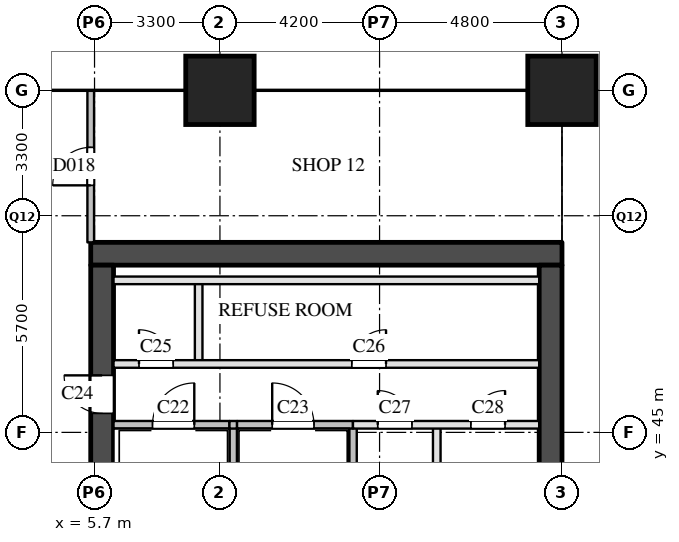
"""IFC4 building model, lengths in metres.
Left out: names, types, materials, properties, quantities, classifications, styles, units other than length and angle.
Written with IfcOpenShell. Run it as: python <this file> out.ifc"""

import sys

from ifc_helpers import new_model, si_unit, direction, frame, frame_2d, origin, origin_2d, place, context, subcontext, project, spatial, rectangle, extrude, element, fill, save


model = new_model("IFC4")
c1 = context("Model", 3, precision=1e-05, world=origin(), true_north=direction((0.0, 1.0)))
c2 = subcontext(c1, "Body", "Model", "MODEL_VIEW")
j1 = project(units=[si_unit("LENGTHUNIT", "METRE"), si_unit("PLANEANGLEUNIT", "RADIAN")], contexts=[c1])
p1 = place(None, origin())
s1 = spatial("IfcSite", under=j1, at=p1, CompositionType="ELEMENT")
p2 = place(p1, origin())
s2 = spatial("IfcBuilding", under=s1, at=p2, CompositionType="ELEMENT")
p3 = place(p2, frame((0.0, 0.0, 14.0)))
s3 = spatial("IfcBuildingStorey", under=s2, at=p3, CompositionType="ELEMENT", Elevation=14.0)
for number, where, z_axis, x_axis in (
    (1, (9.0, 54.0, 0.0), (0.0, 0.0, 1.0), (1.0, 0.0, 0.0)),
    (2, (18.0, 54.0, 0.0), (0.0, 0.0, 1.0), (1.0, 0.0, 0.0)),
):
    element("IfcColumn", number, at=place(p3, frame(where, z_axis=z_axis, x_axis=x_axis)), inside=s3, PredefinedType="COLUMN", context=c2, shape_type="SweptSolid", body=[
        extrude(rectangle(XDim=1.8, YDim=1.8, at=origin_2d()), origin(), (0.0, 0.0, 1.0), 7.0),
    ])
p4 = place(p3, frame((5.6, 49.7, 0.0), z_axis=(0.0, 0.0, 1.0), x_axis=(1.0, 0.0, 0.0)))
e3 = element("IfcWall", 3, at=p4, inside=s3, PredefinedType="SHEAR", context=c2, shape_type="SweptSolid", body=[
    extrude(rectangle(XDim=12.4, YDim=0.6, at=frame_2d((6.2, 0.0))), origin(), (0.0, 0.0, 1.0), 6.59),
])
p5 = place(p3, frame((5.9, 29.1, 0.0), z_axis=(0.0, 0.0, 1.0), x_axis=(0.0, 1.0, 0.0)))
e4 = element("IfcWall", 4, at=p5, inside=s3, PredefinedType="SHEAR", context=c2, shape_type="SweptSolid", body=[
    extrude(rectangle(XDim=20.3, YDim=0.6, at=frame_2d((10.15, 0.0))), origin(), (0.0, 0.0, 1.0), 6.59),
])
p6 = place(p5, frame((3.6, 0.0, 0.0)))
e5 = element("IfcOpeningElement", 5, at=p6, cuts=e4, PredefinedType="OPENING", context=c2, shape_type="SweptSolid", body=[
    extrude(rectangle(XDim=1.8, YDim=2.1, at=frame_2d((0.9, 1.05))), frame((0.0, 0.31, 0.0), z_axis=(0.0, -1.0, 0.0), x_axis=(1.0, 0.0, 0.0)), (0.0, 0.0, 1.0), 0.62),
])
p7 = place(p5, frame((16.4, 0.0, 0.0)))
e6 = element("IfcOpeningElement", 6, at=p7, cuts=e4, PredefinedType="OPENING", context=c2, shape_type="SweptSolid", body=[
    extrude(rectangle(XDim=1.0, YDim=2.1, at=frame_2d((0.5, 1.05))), frame((0.0, 0.31, 0.0), z_axis=(0.0, -1.0, 0.0), x_axis=(1.0, 0.0, 0.0)), (0.0, 0.0, 1.0), 0.62),
])
p8 = place(p3, frame((17.7, 29.1, 0.0), z_axis=(0.0, 0.0, 1.0), x_axis=(0.0, 1.0, 0.0)))
e7 = element("IfcWall", 7, at=p8, inside=s3, PredefinedType="SHEAR", context=c2, shape_type="SweptSolid", body=[
    extrude(rectangle(XDim=20.3, YDim=0.6, at=frame_2d((10.15, 0.0))), origin(), (0.0, 0.0, 1.0), 6.59),
])
p9 = place(p3, frame((8.44, 46.8, 0.0), z_axis=(0.0, 0.0, 1.0), x_axis=(0.0, 1.0, 0.0)))
e8 = element("IfcWall", 8, at=p9, inside=s3, PredefinedType="PARTITIONING", context=c2, shape_type="SweptSolid", body=[
    extrude(rectangle(XDim=2.2, YDim=0.2, at=frame_2d((1.1, 0.0))), origin(), (0.0, 0.0, 1.0), 6.59),
])
for number, where, z_axis, x_axis in (
    (9, (9.35, 43.7, 0.0), (0.0, 0.0, 1.0), (0.0, 1.0, 0.0)),
    (10, (12.5, 43.7, 0.0), (0.0, 0.0, 1.0), (0.0, 1.0, 0.0)),
):
    element("IfcWall", number, at=place(p3, frame(where, z_axis=z_axis, x_axis=x_axis)), inside=s3, PredefinedType="SOLIDWALL", context=c2, shape_type="SweptSolid", body=[
        extrude(rectangle(XDim=1.5, YDim=0.2, at=frame_2d((0.75, 0.0))), origin(), (0.0, 0.0, 1.0), 6.59),
    ])
p10 = place(p3, frame((14.705, 39.0, 0.0), z_axis=(0.0, 0.0, 1.0), x_axis=(0.0, 1.0, 0.0)))
e11 = element("IfcWall", 11, at=p10, inside=s3, PredefinedType="PARTITIONING", context=c2, shape_type="SweptSolid", body=[
    extrude(rectangle(XDim=6.2, YDim=0.2, at=frame_2d((3.1, 0.0))), origin(), (0.0, 0.0, 1.0), 6.59),
])
p11 = place(p3, frame((12.5, 45.2, 0.0), z_axis=(0.0, 0.0, 1.0), x_axis=(1.0, 0.0, 0.0)))
e12 = element("IfcWall", 12, at=p11, inside=s3, PredefinedType="PARTITIONING", context=c2, shape_type="SweptSolid", body=[
    extrude(rectangle(XDim=4.9, YDim=0.2, at=frame_2d((2.45, 0.0))), origin(), (0.0, 0.0, 1.0), 6.59),
])
p12 = place(p11, frame((0.653, 0.0, 0.0)))
e13 = element("IfcOpeningElement", 13, at=p12, cuts=e12, PredefinedType="OPENING", context=c2, shape_type="SweptSolid", body=[
    extrude(rectangle(XDim=0.9, YDim=2.1, at=frame_2d((0.45, 1.05))), frame((0.0, 0.11, 0.0), z_axis=(0.0, -1.0, 0.0), x_axis=(1.0, 0.0, 0.0)), (0.0, 0.0, 1.0), 0.22),
])
p13 = place(p11, frame((3.103, 0.0, 0.0)))
e14 = element("IfcOpeningElement", 14, at=p13, cuts=e12, PredefinedType="OPENING", context=c2, shape_type="SweptSolid", body=[
    extrude(rectangle(XDim=0.9, YDim=2.1, at=frame_2d((0.45, 1.05))), frame((0.0, 0.11, 0.0), z_axis=(0.0, -1.0, 0.0), x_axis=(1.0, 0.0, 0.0)), (0.0, 0.0, 1.0), 0.22),
])
p14 = place(p3, frame((6.2, 45.2, 0.0), z_axis=(0.0, 0.0, 1.0), x_axis=(1.0, 0.0, 0.0)))
e15 = element("IfcWall", 15, at=p14, inside=s3, PredefinedType="SOLIDWALL", context=c2, shape_type="SweptSolid", body=[
    extrude(rectangle(XDim=3.05, YDim=0.2, at=frame_2d((1.525, 0.0))), origin(), (0.0, 0.0, 1.0), 6.59),
])
p15 = place(p14, frame((1.025, 0.0, 0.0)))
e16 = element("IfcOpeningElement", 16, at=p15, cuts=e15, PredefinedType="OPENING", context=c2, shape_type="SweptSolid", body=[
    extrude(rectangle(XDim=1.1, YDim=2.1, at=frame_2d((0.55, 1.05))), frame((0.0, 0.11, 0.0), z_axis=(0.0, -1.0, 0.0), x_axis=(1.0, 0.0, 0.0)), (0.0, 0.0, 1.0), 0.22),
])
p16 = place(p3, frame((9.25, 45.2, 0.0), z_axis=(0.0, 0.0, 1.0), x_axis=(1.0, 0.0, 0.0)))
e17 = element("IfcWall", 17, at=p16, inside=s3, PredefinedType="SOLIDWALL", context=c2, shape_type="SweptSolid", body=[
    extrude(rectangle(XDim=0.2, YDim=0.2, at=frame_2d((0.1, 0.0))), origin(), (0.0, 0.0, 1.0), 6.59),
])
p17 = place(p3, frame((9.45, 45.2, 0.0), z_axis=(0.0, 0.0, 1.0), x_axis=(1.0, 0.0, 0.0)))
e18 = element("IfcWall", 18, at=p17, inside=s3, PredefinedType="SOLIDWALL", context=c2, shape_type="SweptSolid", body=[
    extrude(rectangle(XDim=3.05, YDim=0.2, at=frame_2d((1.525, 0.0))), origin(), (0.0, 0.0, 1.0), 6.59),
])
p18 = place(p17, frame((0.925, 0.0, 0.0)))
e19 = element("IfcOpeningElement", 19, at=p18, cuts=e18, PredefinedType="OPENING", context=c2, shape_type="SweptSolid", body=[
    extrude(rectangle(XDim=1.1, YDim=2.1, at=frame_2d((0.55, 1.05))), frame((0.0, 0.11, 0.0), z_axis=(0.0, -1.0, 0.0), x_axis=(1.0, 0.0, 0.0)), (0.0, 0.0, 1.0), 0.22),
])
p19 = place(p3, frame((6.2, 46.8, 0.0), z_axis=(0.0, 0.0, 1.0), x_axis=(1.0, 0.0, 0.0)))
e20 = element("IfcWall", 20, at=p19, inside=s3, PredefinedType="PARTITIONING", context=c2, shape_type="SweptSolid", body=[
    extrude(rectangle(XDim=11.2, YDim=0.2, at=frame_2d((5.6, 0.0))), origin(), (0.0, 0.0, 1.0), 6.59),
])
p20 = place(p19, frame((0.67, 0.0, 0.0)))
e21 = element("IfcOpeningElement", 21, at=p20, cuts=e20, PredefinedType="OPENING", context=c2, shape_type="SweptSolid", body=[
    extrude(rectangle(XDim=0.9, YDim=2.1, at=frame_2d((0.45, 1.05))), frame((0.0, 0.11, 0.0), z_axis=(0.0, -1.0, 0.0), x_axis=(1.0, 0.0, 0.0)), (0.0, 0.0, 1.0), 0.22),
])
p21 = place(p19, frame((6.27, 0.0, 0.0)))
e22 = element("IfcOpeningElement", 22, at=p21, cuts=e20, PredefinedType="OPENING", context=c2, shape_type="SweptSolid", body=[
    extrude(rectangle(XDim=0.9, YDim=2.1, at=frame_2d((0.45, 1.05))), frame((0.0, 0.11, 0.0), z_axis=(0.0, -1.0, 0.0), x_axis=(1.0, 0.0, 0.0)), (0.0, 0.0, 1.0), 0.22),
])
p22 = place(p3, frame((6.2, 49.0, 0.0), z_axis=(0.0, 0.0, 1.0), x_axis=(1.0, 0.0, 0.0)))
e23 = element("IfcWall", 23, at=p22, inside=s3, PredefinedType="PARTITIONING", context=c2, shape_type="SweptSolid", body=[
    extrude(rectangle(XDim=11.2, YDim=0.2, at=frame_2d((5.6, 0.0))), origin(), (0.0, 0.0, 1.0), 6.59),
])
p23 = place(p3, frame((5.6, 50.0, 0.0), z_axis=(0.0, 0.0, 1.0), x_axis=(0.0, 1.0, 0.0)))
e24 = element("IfcWall", 24, at=p23, inside=s3, PredefinedType="PARTITIONING", context=c2, shape_type="SweptSolid", body=[
    extrude(rectangle(XDim=4.0, YDim=0.175, at=frame_2d((2.0, 0.0))), origin(), (0.0, 0.0, 1.0), 5.59),
])
p24 = place(p23, frame((1.5, 0.0, 0.0)))
e25 = element("IfcOpeningElement", 25, at=p24, cuts=e24, PredefinedType="OPENING", context=c2, shape_type="SweptSolid", body=[
    extrude(rectangle(XDim=1.0, YDim=2.1, at=frame_2d((0.5, 1.05))), frame((0.0, 0.097, 0.0), z_axis=(0.0, -1.0, 0.0), x_axis=(1.0, 0.0, 0.0)), (0.0, 0.0, 1.0), 0.195),
])
p25 = place(p15, origin())
e26 = element("IfcDoor", 26, at=p25, inside=s3, OperationType="SINGLE_SWING_RIGHT", PredefinedType="DOOR", context=c2, shape_type="SweptSolid", body=[
    extrude(rectangle(XDim=1.1, YDim=2.1, at=frame_2d((0.55, 1.05))), frame((0.0, 0.025, 0.0), z_axis=(0.0, -1.0, 0.0), x_axis=(1.0, 0.0, 0.0)), (0.0, 0.0, 1.0), 0.05),
])
fill(e16, e26)
p26 = place(p18, origin())
e27 = element("IfcDoor", 27, at=p26, inside=s3, OperationType="SINGLE_SWING_LEFT", PredefinedType="DOOR", context=c2, shape_type="SweptSolid", body=[
    extrude(rectangle(XDim=1.1, YDim=2.1, at=frame_2d((0.55, 1.05))), frame((0.0, 0.025, 0.0), z_axis=(0.0, -1.0, 0.0), x_axis=(1.0, 0.0, 0.0)), (0.0, 0.0, 1.0), 0.05),
])
fill(e19, e27)
p27 = place(p7, origin())
e28 = element("IfcDoor", 28, at=p27, inside=s3, OperationType="SINGLE_SWING_RIGHT", PredefinedType="DOOR", context=c2, shape_type="SweptSolid", body=[
    extrude(rectangle(XDim=1.0, YDim=2.1, at=frame_2d((0.5, 1.05))), frame((0.0, 0.025, 0.0), z_axis=(0.0, -1.0, 0.0), x_axis=(1.0, 0.0, 0.0)), (0.0, 0.0, 1.0), 0.05),
])
fill(e6, e28)
p28 = place(p20, origin())
e29 = element("IfcDoor", 29, at=p28, inside=s3, OperationType="SINGLE_SWING_LEFT", PredefinedType="DOOR", context=c2, shape_type="SweptSolid", body=[
    extrude(rectangle(XDim=0.9, YDim=2.1, at=frame_2d((0.45, 1.05))), frame((0.0, 0.025, 0.0), z_axis=(0.0, -1.0, 0.0), x_axis=(1.0, 0.0, 0.0)), (0.0, 0.0, 1.0), 0.05),
])
fill(e21, e29)
p29 = place(p21, origin())
e30 = element("IfcDoor", 30, at=p29, inside=s3, OperationType="SINGLE_SWING_RIGHT", PredefinedType="DOOR", context=c2, shape_type="SweptSolid", body=[
    extrude(rectangle(XDim=0.9, YDim=2.1, at=frame_2d((0.45, 1.05))), frame((0.0, 0.025, 0.0), z_axis=(0.0, -1.0, 0.0), x_axis=(1.0, 0.0, 0.0)), (0.0, 0.0, 1.0), 0.05),
])
fill(e22, e30)
p30 = place(p12, origin())
e31 = element("IfcDoor", 31, at=p30, inside=s3, OperationType="SINGLE_SWING_LEFT", PredefinedType="DOOR", context=c2, shape_type="SweptSolid", body=[
    extrude(rectangle(XDim=0.9, YDim=2.1, at=frame_2d((0.45, 1.05))), frame((0.0, 0.025, 0.0), z_axis=(0.0, -1.0, 0.0), x_axis=(1.0, 0.0, 0.0)), (0.0, 0.0, 1.0), 0.05),
])
fill(e13, e31)
p31 = place(p13, origin())
e32 = element("IfcDoor", 32, at=p31, inside=s3, OperationType="SINGLE_SWING_RIGHT", PredefinedType="DOOR", context=c2, shape_type="SweptSolid", body=[
    extrude(rectangle(XDim=0.9, YDim=2.1, at=frame_2d((0.45, 1.05))), frame((0.0, 0.025, 0.0), z_axis=(0.0, -1.0, 0.0), x_axis=(1.0, 0.0, 0.0)), (0.0, 0.0, 1.0), 0.05),
])
fill(e14, e32)
p32 = place(p24, origin())
e33 = element("IfcDoor", 33, at=p32, inside=s3, OperationType="SINGLE_SWING_LEFT", PredefinedType="DOOR", context=c2, shape_type="SweptSolid", body=[
    extrude(rectangle(XDim=1.0, YDim=2.1, at=frame_2d((0.5, 1.05))), frame((0.0, 0.025, 0.0), z_axis=(0.0, -1.0, 0.0), x_axis=(1.0, 0.0, 0.0)), (0.0, 0.0, 1.0), 0.05),
])
fill(e25, e33)
save(model, sys.argv[1])
